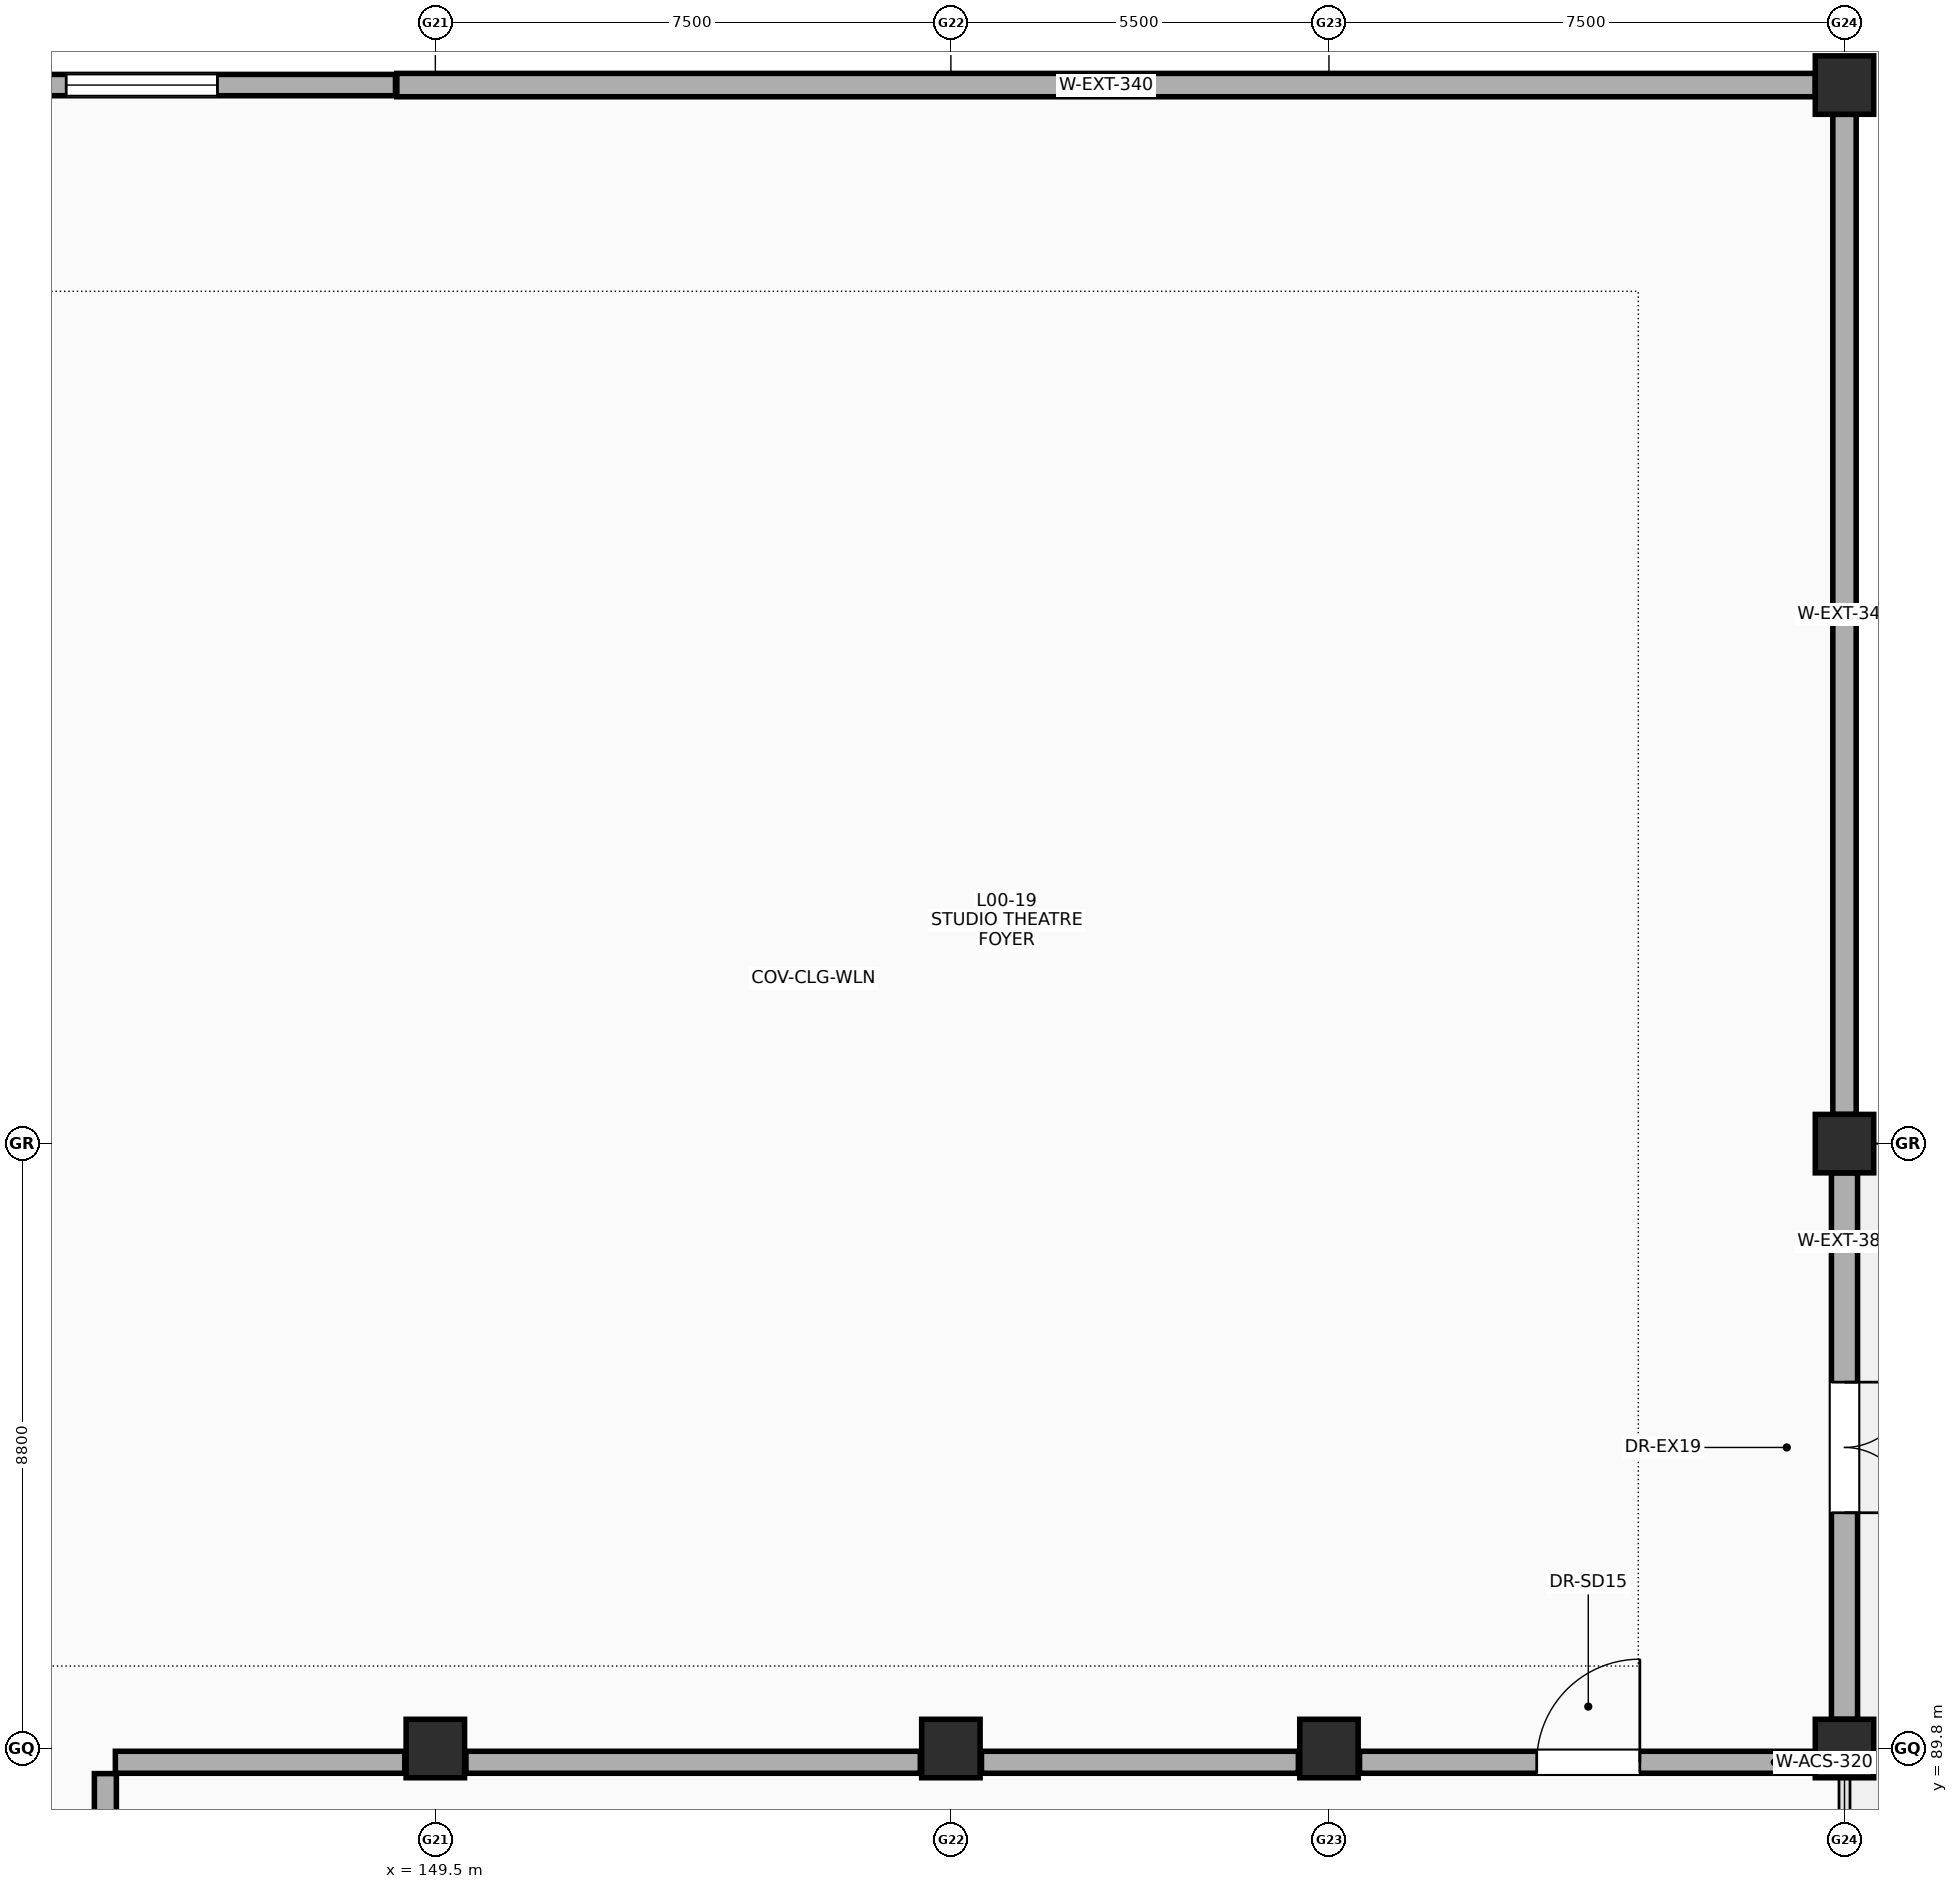
"""IFC4 building model, lengths in metres.
Left out: names, types, materials, properties, quantities, classifications, styles, units other than length and angle.
Written with IfcOpenShell. Run it as: python <this file> out.ifc"""

import sys

from ifc_helpers import new_model, si_unit, direction, frame, frame_2d, origin, origin_2d, place, context, subcontext, project, spatial, rectangle, extrude, element, fill, save


model = new_model("IFC4")
c1 = context("Model", 3, precision=1e-05, world=origin(), true_north=direction((0.0, 1.0)))
c2 = subcontext(c1, "Body", "Model", "MODEL_VIEW")
j1 = project(units=[si_unit("LENGTHUNIT", "METRE"), si_unit("PLANEANGLEUNIT", "RADIAN")], contexts=[c1])
p1 = place(None, origin())
s1 = spatial("IfcSite", under=j1, at=p1, CompositionType="ELEMENT")
p2 = place(p1, origin())
s2 = spatial("IfcBuilding", under=s1, at=p2, CompositionType="ELEMENT")
p3 = place(p2, origin())
s3 = spatial("IfcBuildingStorey", under=s2, at=p3, CompositionType="ELEMENT", Elevation=0.0)
for number, where, z_axis, x_axis in (
    (1, (149.5, 89.8, 0.0), (0.0, 0.0, 1.0), (1.0, 0.0, 0.0)),
    (2, (157.0, 89.8, 0.0), (0.0, 0.0, 1.0), (1.0, 0.0, 0.0)),
    (3, (162.5, 89.8, 0.0), (0.0, 0.0, 1.0), (1.0, 0.0, 0.0)),
    (4, (170.0, 89.8, 0.0), (0.0, 0.0, 1.0), (1.0, 0.0, 0.0)),
    (5, (170.0, 98.6, 0.0), (0.0, 0.0, 1.0), (1.0, 0.0, 0.0)),
    (6, (170.0, 114.0, 0.0), (0.0, 0.0, 1.0), (1.0, 0.0, 0.0)),
):
    element("IfcColumn", number, at=place(p3, frame(where, z_axis=z_axis, x_axis=x_axis)), inside=s3, PredefinedType="COLUMN", context=c2, shape_type="SweptSolid", body=[
        extrude(rectangle(XDim=0.85, YDim=0.85, at=origin_2d()), origin(), (0.0, 0.0, 1.0), 5.4),
    ])
p4 = place(p3, frame((170.0, 90.225, 0.0), z_axis=(0.0, 0.0, 1.0), x_axis=(0.0, 1.0, 0.0)))
e7 = element("IfcWall", 7, at=p4, inside=s3, PredefinedType="SOLIDWALL", context=c2, shape_type="SweptSolid", body=[
    extrude(rectangle(XDim=7.95, YDim=0.38, at=frame_2d((3.975, 0.0))), origin(), (0.0, 0.0, 1.0), 3.9),
])
p5 = place(p4, frame((4.905, 0.0, 0.0), z_axis=(0.0, 0.0, 1.0), x_axis=(-1.0, 0.0, 0.0)))
e8 = element("IfcOpeningElement", 8, at=p5, cuts=e7, PredefinedType="OPENING", context=c2, shape_type="SweptSolid", body=[
    extrude(rectangle(XDim=1.9, YDim=2.35, at=frame_2d((0.95, 1.175))), frame((0.0, 0.2, 0.0), z_axis=(0.0, -1.0, 0.0), x_axis=(1.0, 0.0, 0.0)), (0.0, 0.0, 1.0), 0.4),
])
p6 = place(p3, frame((141.425, 114.0, 0.0), z_axis=(0.0, 0.0, 1.0), x_axis=(1.0, 0.0, 0.0)))
e9 = element("IfcWall", 9, at=p6, inside=s3, PredefinedType="SOLIDWALL", context=c2, shape_type="SweptSolid", body=[
    extrude(rectangle(XDim=7.495, YDim=0.31, at=frame_2d((3.748, 0.0))), origin(), (0.0, 0.0, 1.0), 3.9),
])
p7 = place(p6, frame((2.705, 0.0, 0.9)))
e10 = element("IfcOpeningElement", 10, at=p7, cuts=e9, PredefinedType="OPENING", context=c2, shape_type="SweptSolid", body=[
    extrude(rectangle(XDim=2.2, YDim=2.1, at=frame_2d((1.1, 1.05))), frame((0.0, 0.165, 0.0), z_axis=(0.0, -1.0, 0.0), x_axis=(1.0, 0.0, 0.0)), (0.0, 0.0, 1.0), 0.33),
])
p8 = place(p3, frame((170.0, 99.025, 0.0), z_axis=(0.0, 0.0, 1.0), x_axis=(0.0, 1.0, 0.0)))
e11 = element("IfcWall", 11, at=p8, inside=s3, PredefinedType="SOLIDWALL", context=c2, shape_type="SweptSolid", body=[
    extrude(rectangle(XDim=14.55, YDim=0.34, at=frame_2d((7.275, 0.0))), origin(), (0.0, 0.0, 1.0), 3.9),
])
p9 = place(p3, frame((162.945, 89.6, 0.0), z_axis=(0.0, 0.0, 1.0), x_axis=(1.0, 0.0, 0.0)))
e12 = element("IfcWall", 12, at=p9, inside=s3, PredefinedType="PARTITIONING", context=c2, shape_type="SweptSolid", body=[
    extrude(rectangle(XDim=6.655, YDim=0.32, at=frame_2d((3.328, 0.0))), origin(), (0.0, 0.0, 1.0), 4.2),
])
p10 = place(p9, frame((2.577, 0.0, 0.0)))
e13 = element("IfcOpeningElement", 13, at=p10, cuts=e12, PredefinedType="OPENING", context=c2, shape_type="SweptSolid", body=[
    extrude(rectangle(XDim=1.5, YDim=2.2, at=frame_2d((0.75, 1.1))), frame((0.0, 0.17, 0.0), z_axis=(0.0, -1.0, 0.0), x_axis=(1.0, 0.0, 0.0)), (0.0, 0.0, 1.0), 0.34),
])
p11 = place(p3, frame((149.945, 89.6, 0.0), z_axis=(0.0, 0.0, 1.0), x_axis=(1.0, 0.0, 0.0)))
e14 = element("IfcWall", 14, at=p11, inside=s3, PredefinedType="PARTITIONING", context=c2, shape_type="SweptSolid", body=[
    extrude(rectangle(XDim=6.61, YDim=0.32, at=frame_2d((3.305, 0.0))), origin(), (0.0, 0.0, 1.0), 4.2),
])
p12 = place(p3, frame((157.445, 89.6, 0.0), z_axis=(0.0, 0.0, 1.0), x_axis=(1.0, 0.0, 0.0)))
e15 = element("IfcWall", 15, at=p12, inside=s3, PredefinedType="PARTITIONING", context=c2, shape_type="SweptSolid", body=[
    extrude(rectangle(XDim=4.61, YDim=0.32, at=frame_2d((2.305, 0.0))), origin(), (0.0, 0.0, 1.0), 4.4),
])
p13 = place(p3, frame((144.845, 89.6, 0.0), z_axis=(0.0, 0.0, 1.0), x_axis=(1.0, 0.0, 0.0)))
e16 = element("IfcWall", 16, at=p13, inside=s3, PredefinedType="PARTITIONING", context=c2, shape_type="SweptSolid", body=[
    extrude(rectangle(XDim=4.21, YDim=0.32, at=frame_2d((2.105, 0.0))), origin(), (0.0, 0.0, 1.0), 4.2),
])
p14 = place(p3, frame((144.7, 81.8, 0.0), z_axis=(0.0, 0.0, 1.0), x_axis=(0.0, 1.0, 0.0)))
e17 = element("IfcWall", 17, at=p14, inside=s3, PredefinedType="PARTITIONING", context=c2, shape_type="SweptSolid", body=[
    extrude(rectangle(XDim=7.635, YDim=0.32, at=frame_2d((3.817, 0.0))), origin(), (0.0, 0.0, 1.0), 4.2),
])
p15 = place(p14, frame((3.05, 0.0, 0.0)))
e18 = element("IfcOpeningElement", 18, at=p15, cuts=e17, PredefinedType="OPENING", context=c2, shape_type="SweptSolid", body=[
    extrude(rectangle(XDim=1.5, YDim=2.2, at=frame_2d((0.75, 1.1))), frame((0.0, 0.17, 0.0), z_axis=(0.0, -1.0, 0.0), x_axis=(1.0, 0.0, 0.0)), (0.0, 0.0, 1.0), 0.34),
])
p16 = place(p3, frame((148.94, 114.0, 0.0), z_axis=(0.0, 0.0, 1.0), x_axis=(1.0, 0.0, 0.0)))
e19 = element("IfcWall", 19, at=p16, inside=s3, PredefinedType="SOLIDWALL", context=c2, shape_type="SweptSolid", body=[
    extrude(rectangle(XDim=20.635, YDim=0.34, at=frame_2d((10.317, 0.0))), origin(), (0.0, 0.0, 1.0), 3.9),
])
p17 = place(p5, origin())
e20 = element("IfcDoor", 20, at=p17, inside=s3, OperationType="DOUBLE_DOOR_SINGLE_SWING", PredefinedType="DOOR", context=c2, shape_type="SweptSolid", body=[
    extrude(rectangle(XDim=1.9, YDim=2.35, at=frame_2d((0.95, 1.175))), frame((0.0, 0.025, 0.0), z_axis=(0.0, -1.0, 0.0), x_axis=(1.0, 0.0, 0.0)), (0.0, 0.0, 1.0), 0.05),
])
fill(e8, e20)
p18 = place(p7, origin())
e21 = element("IfcWindow", 21, at=p18, inside=s3, PartitioningType="SINGLE_PANEL", PredefinedType="WINDOW", context=c2, shape_type="SweptSolid", body=[
    extrude(rectangle(XDim=2.2, YDim=2.1, at=frame_2d((1.1, 1.05))), frame((0.0, 0.03, 0.0), z_axis=(0.0, -1.0, 0.0), x_axis=(1.0, 0.0, 0.0)), (0.0, 0.0, 1.0), 0.06),
])
fill(e10, e21)
p19 = place(p10, origin())
e22 = element("IfcDoor", 22, at=p19, inside=s3, OperationType="SINGLE_SWING_RIGHT", PredefinedType="DOOR", context=c2, shape_type="SweptSolid", body=[
    extrude(rectangle(XDim=1.5, YDim=2.2, at=frame_2d((0.75, 1.1))), frame((0.0, 0.025, 0.0), z_axis=(0.0, -1.0, 0.0), x_axis=(1.0, 0.0, 0.0)), (0.0, 0.0, 1.0), 0.05),
])
fill(e13, e22)
save(model, sys.argv[1])
